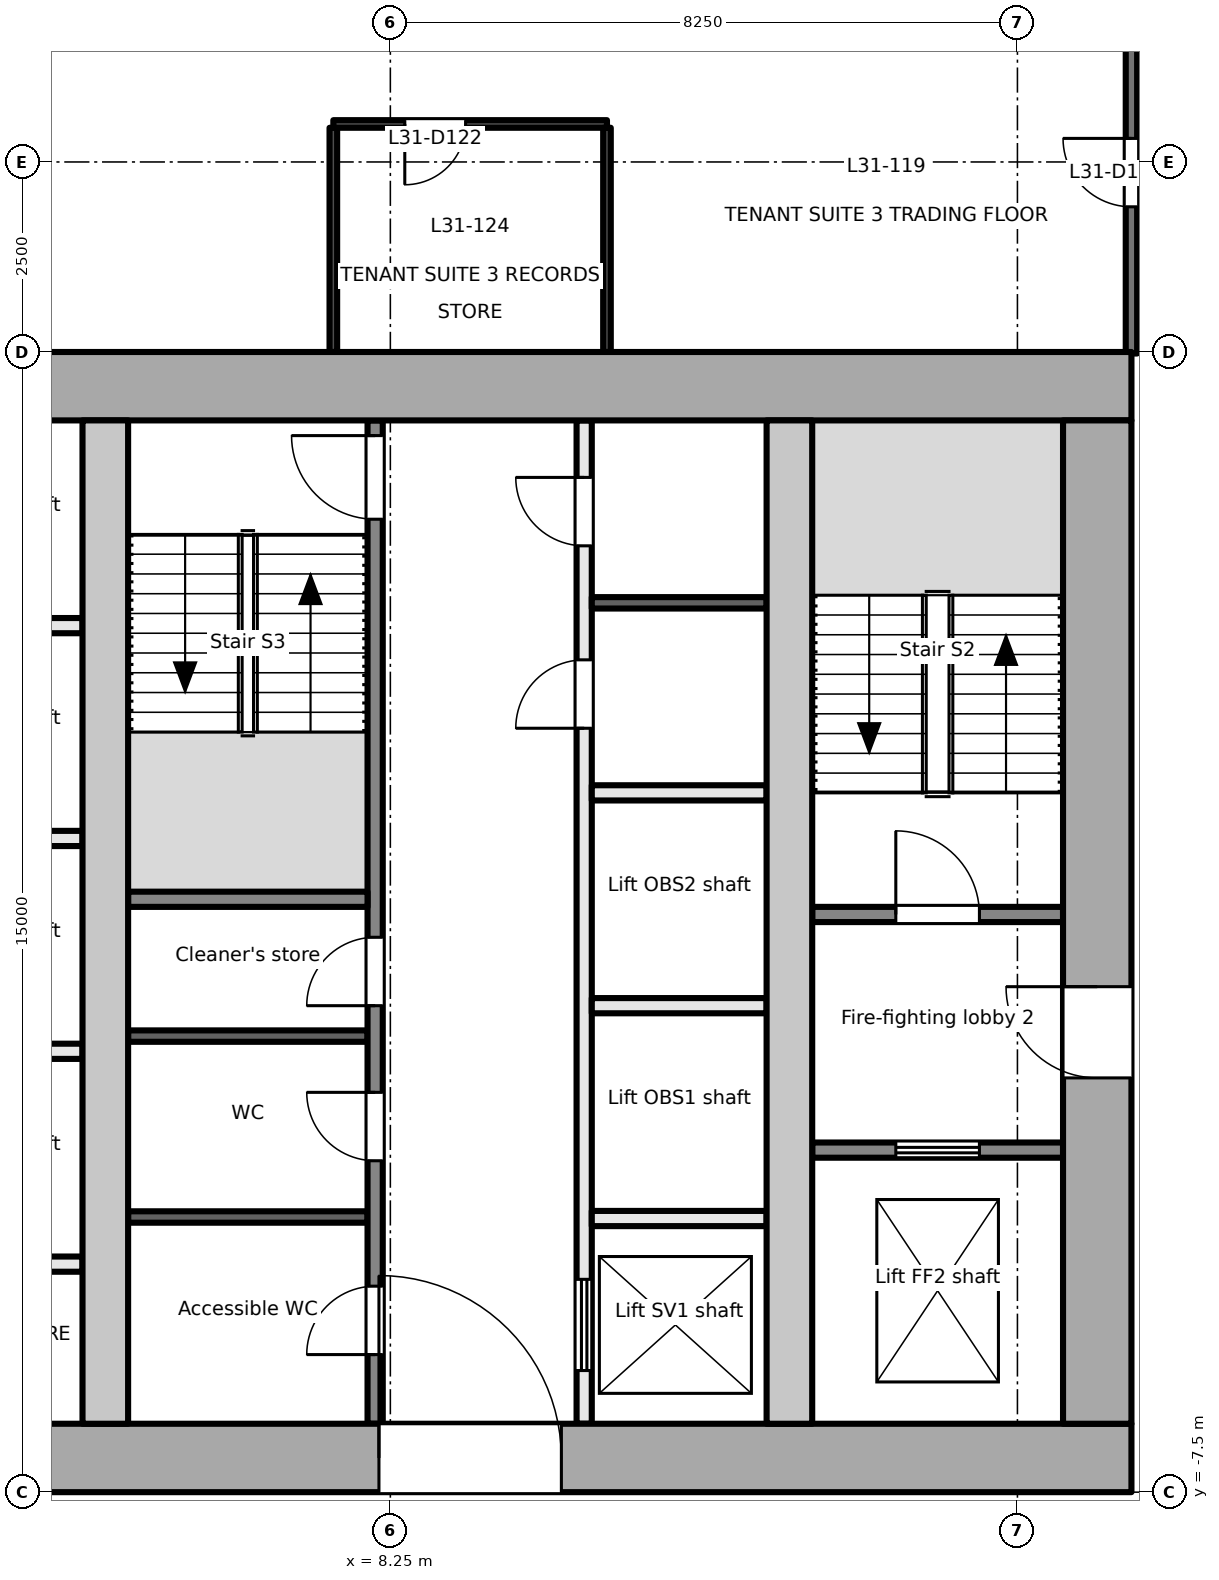
"""IFC4 building model, lengths in metres.
Left out: names, types, materials, properties, quantities, classifications, styles, units other than length and angle.
Written with IfcOpenShell. Run it as: python <this file> out.ifc"""

import sys

from ifc_helpers import new_model, si_unit, direction, frame, frame_2d, origin, place, context, subcontext, project, spatial, rectangle, extrude, element, fill, save


model = new_model("IFC4")
c1 = context("Model", 3, precision=1e-05, world=origin(), true_north=direction((0.0, 1.0)))
c2 = subcontext(c1, "Body", "Model", "MODEL_VIEW")
j1 = project(units=[si_unit("LENGTHUNIT", "METRE"), si_unit("PLANEANGLEUNIT", "RADIAN")], contexts=[c1])
p1 = place(None, origin())
s1 = spatial("IfcSite", under=j1, at=p1, CompositionType="ELEMENT")
p2 = place(p1, origin())
s2 = spatial("IfcBuilding", under=s1, at=p2, CompositionType="ELEMENT")
p3 = place(p2, frame((0.0, 0.0, 138.1)))
s3 = spatial("IfcBuildingStorey", under=s2, at=p3, CompositionType="ELEMENT", Elevation=138.1)
p4 = place(p3, frame((-18.0, -7.05, -0.2), z_axis=(0.0, 0.0, 1.0), x_axis=(1.0, 0.0, 0.0)))
e1 = element("IfcWall", 1, at=p4, inside=s3, PredefinedType="SHEAR", context=c2, shape_type="SweptSolid", body=[
    extrude(rectangle(XDim=36.0, YDim=0.9, at=frame_2d((18.0, 0.0))), origin(), (0.0, 0.0, 1.0), 4.0),
])
p5 = place(p4, frame((7.8, 0.0, 0.2)))
e2 = element("IfcOpeningElement", 2, at=p5, cuts=e1, PredefinedType="OPENING", context=c2, shape_type="SweptSolid", body=[
    extrude(rectangle(XDim=2.4, YDim=2.1, at=frame_2d((1.2, 1.05))), frame((0.0, 0.46, 0.0), z_axis=(0.0, -1.0, 0.0), x_axis=(1.0, 0.0, 0.0)), (0.0, 0.0, 1.0), 0.921),
])
p6 = place(p4, frame((17.4, 0.0, 0.2)))
e3 = element("IfcOpeningElement", 3, at=p6, cuts=e1, PredefinedType="OPENING", context=c2, shape_type="SweptSolid", body=[
    extrude(rectangle(XDim=1.2, YDim=2.1, at=frame_2d((0.6, 1.05))), frame((0.0, 0.46, 0.0), z_axis=(0.0, -1.0, 0.0), x_axis=(1.0, 0.0, 0.0)), (0.0, 0.0, 1.0), 0.921),
])
p7 = place(p4, frame((26.1, 0.0, 0.2)))
e4 = element("IfcOpeningElement", 4, at=p7, cuts=e1, PredefinedType="OPENING", context=c2, shape_type="SweptSolid", body=[
    extrude(rectangle(XDim=2.4, YDim=2.1, at=frame_2d((1.2, 1.05))), frame((0.0, 0.46, 0.0), z_axis=(0.0, -1.0, 0.0), x_axis=(1.0, 0.0, 0.0)), (0.0, 0.0, 1.0), 0.921),
])
p8 = place(p3, frame((-18.0, 7.05, -0.2), z_axis=(0.0, 0.0, 1.0), x_axis=(1.0, 0.0, 0.0)))
e5 = element("IfcWall", 5, at=p8, inside=s3, PredefinedType="SHEAR", context=c2, shape_type="SweptSolid", body=[
    extrude(rectangle(XDim=36.0, YDim=0.9, at=frame_2d((18.0, 0.0))), origin(), (0.0, 0.0, 1.0), 4.0),
])
p9 = place(p3, frame((17.55, -6.6, -0.2), z_axis=(0.0, 0.0, 1.0), x_axis=(0.0, 1.0, 0.0)))
e6 = element("IfcWall", 6, at=p9, inside=s3, PredefinedType="SHEAR", context=c2, shape_type="SweptSolid", body=[
    extrude(rectangle(XDim=13.2, YDim=0.9, at=frame_2d((6.6, 0.0))), origin(), (0.0, 0.0, 1.0), 4.0),
])
p10 = place(p9, frame((4.55, 0.0, 0.2)))
e7 = element("IfcOpeningElement", 7, at=p10, cuts=e6, PredefinedType="OPENING", context=c2, shape_type="SweptSolid", body=[
    extrude(rectangle(XDim=1.2, YDim=2.1, at=frame_2d((0.6, 1.05))), frame((0.0, 0.46, 0.0), z_axis=(0.0, -1.0, 0.0), x_axis=(1.0, 0.0, 0.0)), (0.0, 0.0, 1.0), 0.921),
])
for number, where, z_axis, x_axis in (
    (8, (4.5, -6.6, -0.2), (0.0, 0.0, 1.0), (0.0, 1.0, 0.0)),
    (9, (13.5, -6.6, -0.2), (0.0, 0.0, 1.0), (0.0, 1.0, 0.0)),
):
    element("IfcWall", number, at=place(p3, frame(where, z_axis=z_axis, x_axis=x_axis)), inside=s3, PredefinedType="SHEAR", context=c2, shape_type="SweptSolid", body=[
        extrude(rectangle(XDim=13.2, YDim=0.6, at=frame_2d((6.6, 0.0))), origin(), (0.0, 0.0, 1.0), 4.0),
    ])
p11 = place(p3, frame((13.8, -3.0, 0.0), z_axis=(0.0, 0.0, 1.0), x_axis=(1.0, 0.0, 0.0)))
e10 = element("IfcWall", 10, at=p11, inside=s3, PredefinedType="PARTITIONING", context=c2, shape_type="SweptSolid", body=[
    extrude(rectangle(XDim=3.3, YDim=0.2, at=frame_2d((1.65, 0.0))), origin(), (0.0, 0.0, 1.0), 3.8),
])
p12 = place(p11, frame((1.1, 0.0, 0.0)))
e11 = element("IfcOpeningElement", 11, at=p12, cuts=e10, PredefinedType="OPENING", context=c2, shape_type="SweptSolid", body=[
    extrude(rectangle(XDim=1.1, YDim=2.1, at=frame_2d((0.55, 1.05))), frame((0.0, 0.111, 0.0), z_axis=(0.0, -1.0, 0.0), x_axis=(1.0, 0.0, 0.0)), (0.0, 0.0, 1.0), 0.221),
])
p13 = place(p3, frame((13.8, 0.1, 0.0), z_axis=(0.0, 0.0, 1.0), x_axis=(1.0, 0.0, 0.0)))
e12 = element("IfcWall", 12, at=p13, inside=s3, PredefinedType="PARTITIONING", context=c2, shape_type="SweptSolid", body=[
    extrude(rectangle(XDim=3.3, YDim=0.2, at=frame_2d((1.65, 0.0))), origin(), (0.0, 0.0, 1.0), 3.8),
])
p14 = place(p13, frame((1.1, 0.0, 0.0)))
e13 = element("IfcOpeningElement", 13, at=p14, cuts=e12, PredefinedType="OPENING", context=c2, shape_type="SweptSolid", body=[
    extrude(rectangle(XDim=1.1, YDim=2.1, at=frame_2d((0.55, 1.05))), frame((0.0, 0.111, 0.0), z_axis=(0.0, -1.0, 0.0), x_axis=(1.0, 0.0, 0.0)), (0.0, 0.0, 1.0), 0.221),
])
for number, where, z_axis, x_axis in (
    (14, (1.9, -1.7, 0.0), (0.0, 0.0, 1.0), (1.0, 0.0, 0.0)),
    (15, (1.9, 1.1, 0.0), (0.0, 0.0, 1.0), (1.0, 0.0, 0.0)),
    (16, (1.9, 3.9, 0.0), (0.0, 0.0, 1.0), (1.0, 0.0, 0.0)),
    (17, (1.9, -4.5, 0.0), (0.0, 0.0, 1.0), (1.0, 0.0, 0.0)),
):
    element("IfcWall", number, at=place(p3, frame(where, z_axis=z_axis, x_axis=x_axis)), inside=s3, PredefinedType="PARTITIONING", context=c2, shape_type="SweptSolid", body=[
        extrude(rectangle(XDim=2.3, YDim=0.2, at=frame_2d((1.15, 0.0))), origin(), (0.0, 0.0, 1.0), 3.8),
    ])
p15 = place(p3, frame((8.05, -6.6, 0.0), z_axis=(0.0, 0.0, 1.0), x_axis=(0.0, 1.0, 0.0)))
e18 = element("IfcWall", 18, at=p15, inside=s3, PredefinedType="PARTITIONING", context=c2, shape_type="SweptSolid", body=[
    extrude(rectangle(XDim=13.2, YDim=0.2, at=frame_2d((6.6, 0.0))), origin(), (0.0, 0.0, 1.0), 3.8),
])
p16 = place(p15, frame((0.91, 0.0, 0.0)))
e19 = element("IfcOpeningElement", 19, at=p16, cuts=e18, PredefinedType="OPENING", context=c2, shape_type="SweptSolid", body=[
    extrude(rectangle(XDim=0.9, YDim=2.1, at=frame_2d((0.45, 1.05))), frame((0.0, 0.111, 0.0), z_axis=(0.0, -1.0, 0.0), x_axis=(1.0, 0.0, 0.0)), (0.0, 0.0, 1.0), 0.221),
])
p17 = place(p15, frame((3.46, 0.0, 0.0)))
e20 = element("IfcOpeningElement", 20, at=p17, cuts=e18, PredefinedType="OPENING", context=c2, shape_type="SweptSolid", body=[
    extrude(rectangle(XDim=0.9, YDim=2.1, at=frame_2d((0.45, 1.05))), frame((0.0, 0.111, 0.0), z_axis=(0.0, -1.0, 0.0), x_axis=(1.0, 0.0, 0.0)), (0.0, 0.0, 1.0), 0.221),
])
p18 = place(p15, frame((5.5, 0.0, 0.0)))
e21 = element("IfcOpeningElement", 21, at=p18, cuts=e18, PredefinedType="OPENING", context=c2, shape_type="SweptSolid", body=[
    extrude(rectangle(XDim=0.9, YDim=2.1, at=frame_2d((0.45, 1.05))), frame((0.0, 0.111, 0.0), z_axis=(0.0, -1.0, 0.0), x_axis=(1.0, 0.0, 0.0)), (0.0, 0.0, 1.0), 0.221),
])
p19 = place(p15, frame((11.9, 0.0, 0.0)))
e22 = element("IfcOpeningElement", 22, at=p19, cuts=e18, PredefinedType="OPENING", context=c2, shape_type="SweptSolid", body=[
    extrude(rectangle(XDim=1.1, YDim=2.1, at=frame_2d((0.55, 1.05))), frame((0.0, 0.111, 0.0), z_axis=(0.0, -1.0, 0.0), x_axis=(1.0, 0.0, 0.0)), (0.0, 0.0, 1.0), 0.221),
])
p20 = place(p3, frame((10.8, -6.6, 0.0), z_axis=(0.0, 0.0, 1.0), x_axis=(0.0, 1.0, 0.0)))
e23 = element("IfcWall", 23, at=p20, inside=s3, PredefinedType="PARTITIONING", context=c2, shape_type="SweptSolid", body=[
    extrude(rectangle(XDim=13.2, YDim=0.2, at=frame_2d((6.6, 0.0))), origin(), (0.0, 0.0, 1.0), 3.8),
])
p21 = place(p20, frame((0.7, 0.0, 0.0)))
e24 = element("IfcOpeningElement", 24, at=p21, cuts=e23, PredefinedType="OPENING", context=c2, shape_type="SweptSolid", body=[
    extrude(rectangle(XDim=1.2, YDim=2.1, at=frame_2d((0.6, 1.05))), frame((0.0, 0.111, 0.0), z_axis=(0.0, -1.0, 0.0), x_axis=(1.0, 0.0, 0.0)), (0.0, 0.0, 1.0), 0.221),
])
p22 = place(p20, frame((9.15, 0.0, 0.0)))
e25 = element("IfcOpeningElement", 25, at=p22, cuts=e23, PredefinedType="OPENING", context=c2, shape_type="SweptSolid", body=[
    extrude(rectangle(XDim=0.9, YDim=2.1, at=frame_2d((0.45, 1.05))), frame((0.0, 0.111, 0.0), z_axis=(0.0, -1.0, 0.0), x_axis=(1.0, 0.0, 0.0)), (0.0, 0.0, 1.0), 0.221),
])
p23 = place(p20, frame((11.55, 0.0, 0.0)))
e26 = element("IfcOpeningElement", 26, at=p23, cuts=e23, PredefinedType="OPENING", context=c2, shape_type="SweptSolid", body=[
    extrude(rectangle(XDim=0.9, YDim=2.1, at=frame_2d((0.45, 1.05))), frame((0.0, 0.111, 0.0), z_axis=(0.0, -1.0, 0.0), x_axis=(1.0, 0.0, 0.0)), (0.0, 0.0, 1.0), 0.221),
])
p24 = place(p3, frame((4.8, 0.3, 0.0), z_axis=(0.0, 0.0, 1.0), x_axis=(1.0, 0.0, 0.0)))
e27 = element("IfcWall", 27, at=p24, inside=s3, PredefinedType="PARTITIONING", context=c2, shape_type="SweptSolid", body=[
    extrude(rectangle(XDim=3.15, YDim=0.2, at=frame_2d((1.575, 0.0))), origin(), (0.0, 0.0, 1.0), 3.8),
])
for number, where, z_axis, x_axis in (
    (28, (4.8, -3.88, 0.0), (0.0, 0.0, 1.0), (1.0, 0.0, 0.0)),
    (29, (4.8, -1.5, 0.0), (0.0, 0.0, 1.0), (1.0, 0.0, 0.0)),
):
    element("IfcWall", number, at=place(p3, frame(where, z_axis=z_axis, x_axis=x_axis)), inside=s3, PredefinedType="PARTITIONING", context=c2, shape_type="SweptSolid", body=[
        extrude(rectangle(XDim=3.15, YDim=0.15, at=frame_2d((1.575, 0.0))), origin(), (0.0, 0.0, 1.0), 3.8),
    ])
for number, where, z_axis, x_axis in (
    (30, (10.9, -3.9, 0.0), (0.0, 0.0, 1.0), (1.0, 0.0, 0.0)),
    (31, (10.9, -1.1, 0.0), (0.0, 0.0, 1.0), (1.0, 0.0, 0.0)),
    (32, (10.9, 1.7, 0.0), (0.0, 0.0, 1.0), (1.0, 0.0, 0.0)),
):
    element("IfcWall", number, at=place(p3, frame(where, z_axis=z_axis, x_axis=x_axis)), inside=s3, PredefinedType="PARTITIONING", context=c2, shape_type="SweptSolid", body=[
        extrude(rectangle(XDim=2.3, YDim=0.2, at=frame_2d((1.15, 0.0))), origin(), (0.0, 0.0, 1.0), 3.8),
    ])
p25 = place(p3, frame((10.9, 4.2, 0.0), z_axis=(0.0, 0.0, 1.0), x_axis=(1.0, 0.0, 0.0)))
e33 = element("IfcWall", 33, at=p25, inside=s3, PredefinedType="PARTITIONING", context=c2, shape_type="SweptSolid", body=[
    extrude(rectangle(XDim=2.3, YDim=0.15, at=frame_2d((1.15, 0.0))), origin(), (0.0, 0.0, 1.0), 3.8),
])
p26 = place(p3, frame((18.0, 7.48, 0.0), z_axis=(0.0, 0.0, 1.0), x_axis=(0.0, 1.0, 0.0)))
e34 = element("IfcWall", 34, at=p26, inside=s3, PredefinedType="PARTITIONING", context=c2, shape_type="SweptSolid", body=[
    extrude(rectangle(XDim=4.76, YDim=0.15, at=frame_2d((2.38, 0.0))), origin(), (0.0, 0.0, 1.0), 3.8),
])
p27 = place(p26, frame((1.93, 0.0, 0.0)))
e35 = element("IfcOpeningElement", 35, at=p27, cuts=e34, PredefinedType="OPENING", context=c2, shape_type="SweptSolid", body=[
    extrude(rectangle(XDim=0.9, YDim=2.1, at=frame_2d((0.45, 1.05))), frame((0.0, 0.085, 0.0), z_axis=(0.0, -1.0, 0.0), x_axis=(1.0, 0.0, 0.0)), (0.0, 0.0, 1.0), 0.171),
])
p28 = place(p3, frame((7.5, 10.45, 0.0), z_axis=(0.0, 0.0, 1.0), x_axis=(0.0, -1.0, 0.0)))
e36 = element("IfcWall", 36, at=p28, inside=s3, PredefinedType="PARTITIONING", context=c2, shape_type="SweptSolid", body=[
    extrude(rectangle(XDim=2.95, YDim=0.1, at=frame_2d((1.475, 0.0))), origin(), (0.0, 0.0, 1.0), 3.8),
])
p29 = place(p3, frame((11.1, 10.5, 0.0), z_axis=(0.0, 0.0, 1.0), x_axis=(-1.0, 0.0, 0.0)))
e37 = element("IfcWall", 37, at=p29, inside=s3, PredefinedType="PARTITIONING", context=c2, shape_type="SweptSolid", body=[
    extrude(rectangle(XDim=3.6, YDim=0.1, at=frame_2d((1.8, 0.0))), origin(), (0.0, 0.0, 1.0), 3.5),
])
p30 = place(p29, frame((1.86, 0.0, 0.0)))
e38 = element("IfcOpeningElement", 38, at=p30, cuts=e37, PredefinedType="OPENING", context=c2, shape_type="SweptSolid", body=[
    extrude(rectangle(XDim=0.8, YDim=2.1, at=frame_2d((0.4, 1.05))), frame((0.0, 0.061, 0.0), z_axis=(0.0, -1.0, 0.0), x_axis=(1.0, 0.0, 0.0)), (0.0, 0.0, 1.0), 0.121),
])
p31 = place(p3, frame((11.1, 7.5, 0.0), z_axis=(0.0, 0.0, 1.0), x_axis=(0.0, 1.0, 0.0)))
e39 = element("IfcWall", 39, at=p31, inside=s3, PredefinedType="PARTITIONING", context=c2, shape_type="SweptSolid", body=[
    extrude(rectangle(XDim=2.95, YDim=0.1, at=frame_2d((1.475, 0.0))), origin(), (0.0, 0.0, 1.0), 3.8),
])
p32 = place(p12, origin())
e40 = element("IfcDoor", 40, at=p32, inside=s3, OperationType="DOUBLE_DOOR_SLIDING", PredefinedType="DOOR", context=c2, shape_type="SweptSolid", body=[
    extrude(rectangle(XDim=1.1, YDim=2.1, at=frame_2d((0.55, 1.05))), frame((0.0, 0.025, 0.0), z_axis=(0.0, -1.0, 0.0), x_axis=(1.0, 0.0, 0.0)), (0.0, 0.0, 1.0), 0.05),
])
fill(e11, e40)
p33 = place(p10, origin())
e41 = element("IfcDoor", 41, at=p33, inside=s3, OperationType="SINGLE_SWING_RIGHT", PredefinedType="DOOR", context=c2, shape_type="SweptSolid", body=[
    extrude(rectangle(XDim=1.2, YDim=2.1, at=frame_2d((0.6, 1.05))), frame((0.0, 0.025, 0.0), z_axis=(0.0, -1.0, 0.0), x_axis=(1.0, 0.0, 0.0)), (0.0, 0.0, 1.0), 0.05),
])
fill(e7, e41)
p34 = place(p14, origin())
e42 = element("IfcDoor", 42, at=p34, inside=s3, OperationType="SINGLE_SWING_LEFT", PredefinedType="DOOR", context=c2, shape_type="SweptSolid", body=[
    extrude(rectangle(XDim=1.1, YDim=2.1, at=frame_2d((0.55, 1.05))), frame((0.0, 0.025, 0.0), z_axis=(0.0, -1.0, 0.0), x_axis=(1.0, 0.0, 0.0)), (0.0, 0.0, 1.0), 0.05),
])
fill(e13, e42)
p35 = place(p16, origin())
e43 = element("IfcDoor", 43, at=p35, inside=s3, OperationType="SINGLE_SWING_LEFT", PredefinedType="DOOR", context=c2, shape_type="SweptSolid", body=[
    extrude(rectangle(XDim=0.9, YDim=2.1, at=frame_2d((0.45, 1.05))), frame((0.0, 0.025, 0.0), z_axis=(0.0, -1.0, 0.0), x_axis=(1.0, 0.0, 0.0)), (0.0, 0.0, 1.0), 0.05),
])
fill(e19, e43)
p36 = place(p17, origin())
e44 = element("IfcDoor", 44, at=p36, inside=s3, OperationType="SINGLE_SWING_RIGHT", PredefinedType="DOOR", context=c2, shape_type="SweptSolid", body=[
    extrude(rectangle(XDim=0.9, YDim=2.1, at=frame_2d((0.45, 1.05))), frame((0.0, 0.025, 0.0), z_axis=(0.0, -1.0, 0.0), x_axis=(1.0, 0.0, 0.0)), (0.0, 0.0, 1.0), 0.05),
])
fill(e20, e44)
p37 = place(p18, origin())
e45 = element("IfcDoor", 45, at=p37, inside=s3, OperationType="SINGLE_SWING_LEFT", PredefinedType="DOOR", context=c2, shape_type="SweptSolid", body=[
    extrude(rectangle(XDim=0.9, YDim=2.1, at=frame_2d((0.45, 1.05))), frame((0.0, 0.025, 0.0), z_axis=(0.0, -1.0, 0.0), x_axis=(1.0, 0.0, 0.0)), (0.0, 0.0, 1.0), 0.05),
])
fill(e21, e45)
p38 = place(p19, origin())
e46 = element("IfcDoor", 46, at=p38, inside=s3, OperationType="SINGLE_SWING_RIGHT", PredefinedType="DOOR", context=c2, shape_type="SweptSolid", body=[
    extrude(rectangle(XDim=1.1, YDim=2.1, at=frame_2d((0.55, 1.05))), frame((0.0, 0.025, 0.0), z_axis=(0.0, -1.0, 0.0), x_axis=(1.0, 0.0, 0.0)), (0.0, 0.0, 1.0), 0.05),
])
fill(e22, e46)
p39 = place(p7, origin())
e47 = element("IfcDoor", 47, at=p39, inside=s3, OperationType="DOUBLE_DOOR_DOUBLE_SWING", PredefinedType="DOOR", context=c2, shape_type="SweptSolid", body=[
    extrude(rectangle(XDim=2.4, YDim=2.1, at=frame_2d((1.2, 1.05))), frame((0.0, 0.025, 0.0), z_axis=(0.0, -1.0, 0.0), x_axis=(1.0, 0.0, 0.0)), (0.0, 0.0, 1.0), 0.05),
])
fill(e4, e47)
p40 = place(p21, origin())
e48 = element("IfcDoor", 48, at=p40, inside=s3, OperationType="DOUBLE_DOOR_SLIDING", PredefinedType="DOOR", context=c2, shape_type="SweptSolid", body=[
    extrude(rectangle(XDim=1.2, YDim=2.1, at=frame_2d((0.6, 1.05))), frame((0.0, 0.025, 0.0), z_axis=(0.0, -1.0, 0.0), x_axis=(1.0, 0.0, 0.0)), (0.0, 0.0, 1.0), 0.05),
])
fill(e24, e48)
p41 = place(p22, origin())
e49 = element("IfcDoor", 49, at=p41, inside=s3, OperationType="SINGLE_SWING_LEFT", PredefinedType="DOOR", context=c2, shape_type="SweptSolid", body=[
    extrude(rectangle(XDim=0.9, YDim=2.1, at=frame_2d((0.45, 1.05))), frame((0.0, 0.025, 0.0), z_axis=(0.0, -1.0, 0.0), x_axis=(1.0, 0.0, 0.0)), (0.0, 0.0, 1.0), 0.05),
])
fill(e25, e49)
p42 = place(p23, origin())
e50 = element("IfcDoor", 50, at=p42, inside=s3, OperationType="SINGLE_SWING_RIGHT", PredefinedType="DOOR", context=c2, shape_type="SweptSolid", body=[
    extrude(rectangle(XDim=0.9, YDim=2.1, at=frame_2d((0.45, 1.05))), frame((0.0, 0.025, 0.0), z_axis=(0.0, -1.0, 0.0), x_axis=(1.0, 0.0, 0.0)), (0.0, 0.0, 1.0), 0.05),
])
fill(e26, e50)
p43 = place(p27, origin())
e51 = element("IfcDoor", 51, at=p43, inside=s3, OperationType="SINGLE_SWING_RIGHT", PredefinedType="DOOR", context=c2, shape_type="SweptSolid", body=[
    extrude(rectangle(XDim=0.9, YDim=2.1, at=frame_2d((0.45, 1.05))), frame((0.0, 0.025, 0.0), z_axis=(0.0, -1.0, 0.0), x_axis=(1.0, 0.0, 0.0)), (0.0, 0.0, 1.0), 0.05),
])
fill(e35, e51)
p44 = place(p30, origin())
e52 = element("IfcDoor", 52, at=p44, inside=s3, OperationType="SINGLE_SWING_RIGHT", PredefinedType="DOOR", context=c2, shape_type="SweptSolid", body=[
    extrude(rectangle(XDim=0.8, YDim=2.1, at=frame_2d((0.4, 1.05))), frame((0.0, 0.025, 0.0), z_axis=(0.0, -1.0, 0.0), x_axis=(1.0, 0.0, 0.0)), (0.0, 0.0, 1.0), 0.05),
])
fill(e38, e52)
save(model, sys.argv[1])
